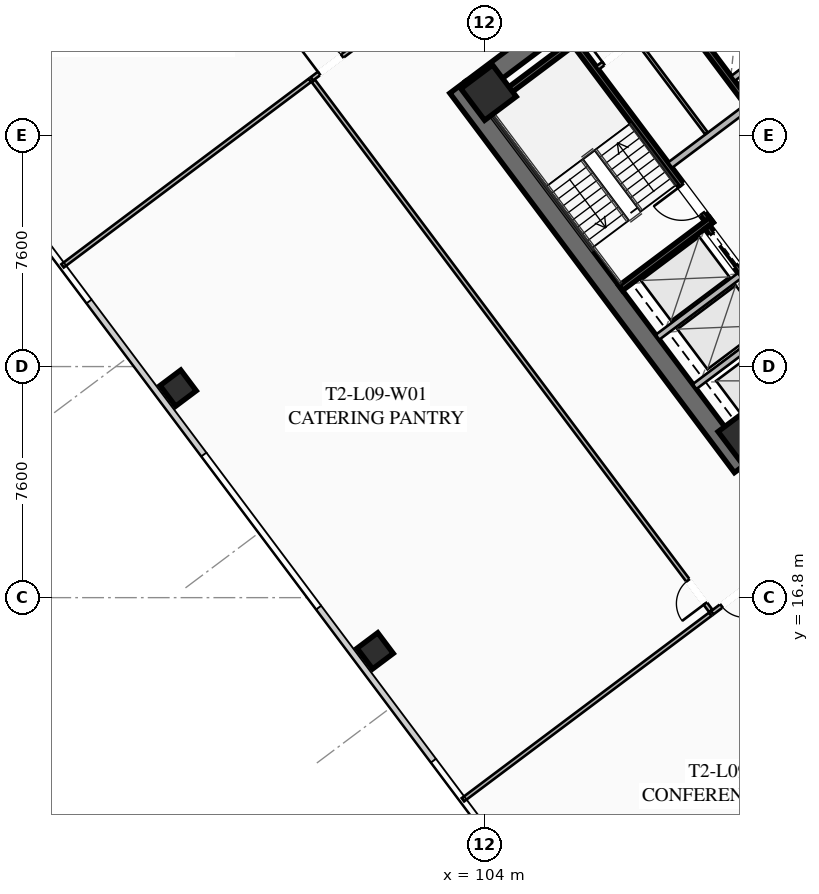
"""IFC4 building model, lengths in metres.
Left out: names, types, materials, properties, quantities, classifications, styles, units other than length and angle.
Written with IfcOpenShell. Run it as: python <this file> out.ifc"""

import sys

from ifc_helpers import new_model, si_unit, direction, frame, frame_2d, origin, origin_2d, place, context, subcontext, project, spatial, rectangle, hollow_rectangle, extrude, element, fill, save


model = new_model("IFC4")
c1 = context("Model", 3, precision=1e-05, world=origin(), true_north=direction((0.0, 1.0)))
c2 = subcontext(c1, "Body", "Model", "MODEL_VIEW")
j1 = project(units=[si_unit("LENGTHUNIT", "METRE"), si_unit("PLANEANGLEUNIT", "RADIAN")], contexts=[c1])
p1 = place(None, origin())
s1 = spatial("IfcSite", under=j1, at=p1, CompositionType="ELEMENT")
p2 = place(p1, origin())
s2 = spatial("IfcBuilding", under=s1, at=p2, CompositionType="ELEMENT")
p3 = place(p2, frame((0.0, 0.0, 38.8)))
s3 = spatial("IfcBuildingStorey", under=s2, at=p3, CompositionType="ELEMENT", Elevation=38.8)
p4 = place(p3, frame((112.476, 21.107, 0.0), z_axis=(0.0, 0.0, 1.0), x_axis=(-0.600005007985, 0.799996243986, 0.0)))
e1 = element("IfcWall", 1, at=p4, inside=s3, PredefinedType="SHEAR", context=c2, shape_type="SweptSolid", body=[
    extrude(rectangle(XDim=15.6, YDim=0.65, at=frame_2d((7.8, 0.0))), origin(), (0.0, 0.0, 1.0), 3.55),
])
p5 = place(p3, frame((124.429, 30.478, 0.0), z_axis=(0.0, 0.0, 1.0), x_axis=(-0.799998028465, -0.600002628705, 0.0)))
e2 = element("IfcWall", 2, at=p5, inside=s3, PredefinedType="SHEAR", context=c2, shape_type="SweptSolid", body=[
    extrude(rectangle(XDim=14.86, YDim=0.65, at=frame_2d((7.43, 0.0))), origin(), (0.0, 0.0, 1.0), 3.55),
])
p6 = place(p5, frame((9.13, 0.0, 0.0)))
e3 = element("IfcOpeningElement", 3, at=p6, cuts=e2, PredefinedType="OPENING", context=c2, shape_type="SweptSolid", body=[
    extrude(rectangle(XDim=1.25, YDim=2.25, at=frame_2d((0.625, 1.125))), frame((0.0, 0.335, 0.0), z_axis=(0.0, -1.0, 0.0), x_axis=(1.0, 0.0, 0.0)), (0.0, 0.0, 1.0), 0.67),
])
p7 = place(p5, frame((4.08, 0.0, 0.0)))
e4 = element("IfcOpeningElement", 4, at=p7, cuts=e2, PredefinedType="OPENING", context=c2, shape_type="SweptSolid", body=[
    extrude(rectangle(XDim=1.25, YDim=2.25, at=frame_2d((0.625, 1.125))), frame((0.0, 0.335, 0.0), z_axis=(0.0, -1.0, 0.0), x_axis=(1.0, 0.0, 0.0)), (0.0, 0.0, 1.0), 0.67),
])
p8 = place(p3, frame((103.571, 33.522, 0.0), z_axis=(0.0, 0.0, 1.0), x_axis=(0.799998028465, 0.600002628705, 0.0)))
e5 = element("IfcWall", 5, at=p8, inside=s3, PredefinedType="SHEAR", context=c2, shape_type="SweptSolid", body=[
    extrude(rectangle(XDim=14.86, YDim=0.65, at=frame_2d((7.43, 0.0))), origin(), (0.0, 0.0, 1.0), 3.55),
])
p9 = place(p8, frame((4.48, 0.0, 0.0)))
e6 = element("IfcOpeningElement", 6, at=p9, cuts=e5, PredefinedType="OPENING", context=c2, shape_type="SweptSolid", body=[
    extrude(rectangle(XDim=1.25, YDim=2.25, at=frame_2d((0.625, 1.125))), frame((0.0, 0.335, 0.0), z_axis=(0.0, -1.0, 0.0), x_axis=(1.0, 0.0, 0.0)), (0.0, 0.0, 1.0), 0.67),
])
p10 = place(p8, frame((9.53, 0.0, 0.0)))
e7 = element("IfcOpeningElement", 7, at=p10, cuts=e5, PredefinedType="OPENING", context=c2, shape_type="SweptSolid", body=[
    extrude(rectangle(XDim=1.25, YDim=2.25, at=frame_2d((0.625, 1.125))), frame((0.0, 0.335, 0.0), z_axis=(0.0, -1.0, 0.0), x_axis=(1.0, 0.0, 0.0)), (0.0, 0.0, 1.0), 0.67),
])
for number, where, z_axis, x_axis in (
    (8, (112.59, 22.13, 0.0), (0.0, 0.0, 1.0), (0.8, 0.6, 0.0)),
    (9, (104.13, 33.41, 0.0), (0.0, 0.0, 1.0), (0.8, 0.6, 0.0)),
):
    element("IfcColumn", number, at=place(p3, frame(where, z_axis=z_axis, x_axis=x_axis)), inside=s3, PredefinedType="COLUMN", context=c2, shape_type="SweptSolid", body=[
        extrude(hollow_rectangle(XDim=1.3, YDim=1.3, WallThickness=0.05, at=origin_2d()), origin(), (0.0, 0.0, 1.0), 3.35),
    ])
for number, where, z_axis, x_axis in (
    (10, (93.92, 23.69, 0.0), (0.0, 0.0, 1.0), (0.8, 0.6, 0.0)),
    (11, (100.4, 15.05, 0.0), (0.0, 0.0, 1.0), (0.8, 0.6, 0.0)),
):
    element("IfcColumn", number, at=place(p3, frame(where, z_axis=z_axis, x_axis=x_axis)), inside=s3, PredefinedType="COLUMN", context=c2, shape_type="SweptSolid", body=[
        extrude(hollow_rectangle(XDim=0.85, YDim=0.85, WallThickness=0.035, at=origin_2d()), origin(), (0.0, 0.0, 1.0), 3.35),
    ])
p11 = place(p3, frame((111.44, 29.08, 0.0), z_axis=(0.0, 0.0, 1.0), x_axis=(-0.600009827119, 0.799992629566, 0.0)))
e12 = element("IfcWall", 12, at=p11, inside=s3, PredefinedType="SHEAR", context=c2, shape_type="SweptSolid", body=[
    extrude(rectangle(XDim=7.95, YDim=0.2, at=frame_2d((3.975, 0.0))), origin(), (0.0, 0.0, 1.0), 3.35),
])
p12 = place(p11, frame((0.45, 0.0, 0.0)))
e13 = element("IfcOpeningElement", 13, at=p12, cuts=e12, PredefinedType="OPENING", context=c2, shape_type="SweptSolid", body=[
    extrude(rectangle(XDim=1.15, YDim=2.2, at=frame_2d((0.575, 1.1))), frame((0.0, 0.11, 0.0), z_axis=(0.0, -1.0, 0.0), x_axis=(1.0, 0.0, 0.0)), (0.0, 0.0, 1.0), 0.22),
])
for number, where, z_axis, x_axis in (
    (14, (108.476, 26.982, 0.0), (0.0, 0.0, 1.0), (0.8, 0.6, 0.0)),
    (15, (104.036, 32.902, 0.0), (0.0, 0.0, 1.0), (0.8, 0.6, 0.0)),
):
    element("IfcWall", number, at=place(p3, frame(where, z_axis=z_axis, x_axis=x_axis)), inside=s3, PredefinedType="SHEAR", context=c2, shape_type="SweptSolid", body=[
        extrude(rectangle(XDim=3.73, YDim=0.2, at=frame_2d((1.865, 0.0))), origin(), (0.0, 0.0, 1.0), 3.35),
    ])
p13 = place(p3, frame((117.938, 26.016, 0.0), z_axis=(0.0, 0.0, 1.0), x_axis=(-0.600005463273, 0.799995902516, 0.0)))
e16 = element("IfcWall", 16, at=p13, inside=s3, PredefinedType="SHEAR", context=c2, shape_type="SweptSolid", body=[
    extrude(rectangle(XDim=14.3, YDim=0.2, at=frame_2d((7.15, 0.0))), origin(), (0.0, 0.0, 1.0), 3.35),
])
p14 = place(p3, frame((110.104, 31.028, 0.0), z_axis=(0.0, 0.0, 1.0), x_axis=(0.800018601094, 0.59997519774, 0.0)))
e17 = element("IfcWall", 17, at=p14, inside=s3, PredefinedType="SOLIDWALL", context=c2, shape_type="SweptSolid", body=[
    extrude(rectangle(XDim=3.15, YDim=0.22, at=frame_2d((1.575, 0.0))), origin(), (0.0, 0.0, 1.0), 2.703),
])
p15 = place(p3, frame((115.13, 23.91, 0.0), z_axis=(0.0, 0.0, 1.0), x_axis=(-0.599975393228, 0.800018454488, 0.0)))
e18 = element("IfcWall", 18, at=p15, inside=s3, PredefinedType="SHEAR", context=c2, shape_type="SweptSolid", body=[
    extrude(rectangle(XDim=6.35, YDim=0.2, at=frame_2d((3.175, 0.0))), origin(), (0.0, 0.0, 1.0), 3.35),
])
p16 = place(p15, frame((4.775, 0.0, 0.0)))
e19 = element("IfcOpeningElement", 19, at=p16, cuts=e18, PredefinedType="OPENING", context=c2, shape_type="SweptSolid", body=[
    extrude(rectangle(XDim=1.3, YDim=2.25, at=frame_2d((0.65, 1.125))), frame((0.0, 0.11, 0.0), z_axis=(0.0, -1.0, 0.0), x_axis=(1.0, 0.0, 0.0)), (0.0, 0.0, 1.0), 0.22),
])
p17 = place(p15, frame((2.775, 0.0, 0.0)))
e20 = element("IfcOpeningElement", 20, at=p17, cuts=e18, PredefinedType="OPENING", context=c2, shape_type="SweptSolid", body=[
    extrude(rectangle(XDim=1.3, YDim=2.25, at=frame_2d((0.65, 1.125))), frame((0.0, 0.11, 0.0), z_axis=(0.0, -1.0, 0.0), x_axis=(1.0, 0.0, 0.0)), (0.0, 0.0, 1.0), 0.22),
])
p18 = place(p15, frame((0.575, 0.0, 0.0)))
e21 = element("IfcOpeningElement", 21, at=p18, cuts=e18, PredefinedType="OPENING", context=c2, shape_type="SweptSolid", body=[
    extrude(rectangle(XDim=1.3, YDim=2.25, at=frame_2d((0.65, 1.125))), frame((0.0, 0.11, 0.0), z_axis=(0.0, -1.0, 0.0), x_axis=(1.0, 0.0, 0.0)), (0.0, 0.0, 1.0), 0.22),
])
for number, where, z_axis, x_axis in (
    (22, (110.906, 23.742, 0.0), (0.0, 0.0, 1.0), (0.8, 0.6, 0.0)),
    (23, (109.688, 25.366, 0.0), (0.0, 0.0, 1.0), (0.8, 0.6, 0.0)),
):
    element("IfcWall", number, at=place(p3, frame(where, z_axis=z_axis, x_axis=x_axis)), inside=s3, PredefinedType="SOLIDWALL", context=c2, shape_type="SweptSolid", body=[
        extrude(rectangle(XDim=3.38, YDim=0.2, at=frame_2d((1.69, 0.0))), origin(), (0.0, 0.0, 1.0), 3.35),
    ])
p19 = place(p3, frame((107.71, 34.22, 0.0), z_axis=(0.0, 0.0, 1.0), x_axis=(0.799981399002, 0.60002480053, 0.0)))
e24 = element("IfcWall", 24, at=p19, inside=s3, PredefinedType="PARTITIONING", context=c2, shape_type="SweptSolid", body=[
    extrude(rectangle(XDim=3.15, YDim=0.135, at=frame_2d((1.575, 0.0))), origin(), (0.0, 0.0, 1.0), 2.703),
])
p20 = place(p19, frame((0.25, 0.0, 0.0)))
e25 = element("IfcOpeningElement", 25, at=p20, cuts=e24, PredefinedType="OPENING", context=c2, shape_type="SweptSolid", body=[
    extrude(rectangle(XDim=0.95, YDim=2.05, at=frame_2d((0.475, 1.025))), frame((0.0, 0.077, 0.0), z_axis=(0.0, -1.0, 0.0), x_axis=(1.0, 0.0, 0.0)), (0.0, 0.0, 1.0), 0.155),
])
p21 = place(p19, frame((1.95, 0.0, 0.0)))
e26 = element("IfcOpeningElement", 26, at=p21, cuts=e24, PredefinedType="OPENING", context=c2, shape_type="SweptSolid", body=[
    extrude(rectangle(XDim=0.95, YDim=2.05, at=frame_2d((0.475, 1.025))), frame((0.0, 0.077, 0.0), z_axis=(0.0, -1.0, 0.0), x_axis=(1.0, 0.0, 0.0)), (0.0, 0.0, 1.0), 0.155),
])
p22 = place(p3, frame((111.296, 32.072, 0.0), z_axis=(0.0, 0.0, 1.0), x_axis=(-0.59995887973, 0.800030838552, 0.0)))
e27 = element("IfcWall", 27, at=p22, inside=s3, PredefinedType="PARTITIONING", context=c2, shape_type="SweptSolid", body=[
    extrude(rectangle(XDim=3.8, YDim=0.11, at=frame_2d((1.9, 0.0))), origin(), (0.0, 0.0, 1.0), 2.703),
])
p23 = place(p3, frame((115.11, 33.27, 0.0), z_axis=(0.0, 0.0, 1.0), x_axis=(-0.600011488909, 0.79999138319, 0.0)))
e28 = element("IfcWall", 28, at=p23, inside=s3, PredefinedType="SOLIDWALL", context=c2, shape_type="SweptSolid", body=[
    extrude(rectangle(XDim=6.8, YDim=0.2, at=frame_2d((3.4, 0.0))), origin(), (0.0, 0.0, 1.0), 3.35),
])
p24 = place(p3, frame((112.176, 33.882, 0.0), z_axis=(0.0, 0.0, 1.0), x_axis=(0.8, 0.6, 0.0)))
e29 = element("IfcWall", 29, at=p24, inside=s3, PredefinedType="SOLIDWALL", context=c2, shape_type="SweptSolid", body=[
    extrude(rectangle(XDim=1.88, YDim=0.2, at=frame_2d((0.94, 0.0))), origin(), (0.0, 0.0, 1.0), 3.35),
])
p25 = place(p3, frame((98.316, 33.862, 0.0), z_axis=(0.0, 0.0, 1.0), x_axis=(0.800001947934, 0.599997402746, 0.0)))
e30 = element("IfcWall", 30, at=p25, inside=s3, PredefinedType="PARTITIONING", context=c2, shape_type="SweptSolid", body=[
    extrude(rectangle(XDim=30.08, YDim=0.135, at=frame_2d((15.04, 0.0))), origin(), (0.0, 0.0, 1.0), 2.703),
])
p26 = place(p25, frame((0.3, 0.0, 0.0)))
e31 = element("IfcOpeningElement", 31, at=p26, cuts=e30, PredefinedType="OPENING", context=c2, shape_type="SweptSolid", body=[
    extrude(rectangle(XDim=0.95, YDim=2.05, at=frame_2d((0.475, 1.025))), frame((0.0, 0.077, 0.0), z_axis=(0.0, -1.0, 0.0), x_axis=(1.0, 0.0, 0.0)), (0.0, 0.0, 1.0), 0.155),
])
p27 = place(p25, frame((7.172, 0.0, 0.0)))
e32 = element("IfcOpeningElement", 32, at=p27, cuts=e30, PredefinedType="OPENING", context=c2, shape_type="SweptSolid", body=[
    extrude(rectangle(XDim=0.95, YDim=2.05, at=frame_2d((0.475, 1.025))), frame((0.0, 0.077, 0.0), z_axis=(0.0, -1.0, 0.0), x_axis=(1.0, 0.0, 0.0)), (0.0, 0.0, 1.0), 0.155),
])
p28 = place(p25, frame((11.218, 0.0, 0.0)))
e33 = element("IfcOpeningElement", 33, at=p28, cuts=e30, PredefinedType="OPENING", context=c2, shape_type="SweptSolid", body=[
    extrude(rectangle(XDim=0.95, YDim=2.05, at=frame_2d((0.475, 1.025))), frame((0.0, 0.077, 0.0), z_axis=(0.0, -1.0, 0.0), x_axis=(1.0, 0.0, 0.0)), (0.0, 0.0, 1.0), 0.155),
])
p29 = place(p25, frame((28.83, 0.0, 0.0)))
e34 = element("IfcOpeningElement", 34, at=p29, cuts=e30, PredefinedType="OPENING", context=c2, shape_type="SweptSolid", body=[
    extrude(rectangle(XDim=0.95, YDim=2.05, at=frame_2d((0.475, 1.025))), frame((0.0, 0.077, 0.0), z_axis=(0.0, -1.0, 0.0), x_axis=(1.0, 0.0, 0.0)), (0.0, 0.0, 1.0), 0.155),
])
p30 = place(p3, frame((135.55, 34.35, 0.0), z_axis=(0.0, 0.0, 1.0), x_axis=(-0.799998052067, -0.600002597235, 0.0)))
e35 = element("IfcWall", 35, at=p30, inside=s3, PredefinedType="PARTITIONING", context=c2, shape_type="SweptSolid", body=[
    extrude(rectangle(XDim=30.08, YDim=0.135, at=frame_2d((15.04, 0.0))), origin(), (0.0, 0.0, 1.0), 2.703),
])
p31 = place(p30, frame((28.75, 0.0, 0.0)))
e36 = element("IfcOpeningElement", 36, at=p31, cuts=e35, PredefinedType="OPENING", context=c2, shape_type="SweptSolid", body=[
    extrude(rectangle(XDim=0.95, YDim=2.05, at=frame_2d((0.475, 1.025))), frame((0.0, 0.077, 0.0), z_axis=(0.0, -1.0, 0.0), x_axis=(1.0, 0.0, 0.0)), (0.0, 0.0, 1.0), 0.155),
])
p32 = place(p30, frame((21.999, 0.0, 0.0)))
e37 = element("IfcOpeningElement", 37, at=p32, cuts=e35, PredefinedType="OPENING", context=c2, shape_type="SweptSolid", body=[
    extrude(rectangle(XDim=0.95, YDim=2.05, at=frame_2d((0.475, 1.025))), frame((0.0, 0.077, 0.0), z_axis=(0.0, -1.0, 0.0), x_axis=(1.0, 0.0, 0.0)), (0.0, 0.0, 1.0), 0.155),
])
p33 = place(p30, frame((17.939, 0.0, 0.0)))
e38 = element("IfcOpeningElement", 38, at=p33, cuts=e35, PredefinedType="OPENING", context=c2, shape_type="SweptSolid", body=[
    extrude(rectangle(XDim=0.95, YDim=2.05, at=frame_2d((0.475, 1.025))), frame((0.0, 0.077, 0.0), z_axis=(0.0, -1.0, 0.0), x_axis=(1.0, 0.0, 0.0)), (0.0, 0.0, 1.0), 0.155),
])
p34 = place(p30, frame((0.38, 0.0, 0.0)))
e39 = element("IfcOpeningElement", 39, at=p34, cuts=e35, PredefinedType="OPENING", context=c2, shape_type="SweptSolid", body=[
    extrude(rectangle(XDim=0.95, YDim=2.05, at=frame_2d((0.475, 1.025))), frame((0.0, 0.077, 0.0), z_axis=(0.0, -1.0, 0.0), x_axis=(1.0, 0.0, 0.0)), (0.0, 0.0, 1.0), 0.155),
])
p35 = place(p3, frame((111.438, 16.366, 0.0), z_axis=(0.0, 0.0, 1.0), x_axis=(-0.599996414648, 0.800002689001, 0.0)))
e40 = element("IfcWall", 40, at=p35, inside=s3, PredefinedType="PARTITIONING", context=c2, shape_type="SweptSolid", body=[
    extrude(rectangle(XDim=21.79, YDim=0.135, at=frame_2d((10.895, 0.0))), origin(), (0.0, 0.0, 1.0), 2.703),
])
p36 = place(p35, frame((0.3, 0.0, 0.0)))
e41 = element("IfcOpeningElement", 41, at=p36, cuts=e40, PredefinedType="OPENING", context=c2, shape_type="SweptSolid", body=[
    extrude(rectangle(XDim=0.95, YDim=2.05, at=frame_2d((0.475, 1.025))), frame((0.0, 0.077, 0.0), z_axis=(0.0, -1.0, 0.0), x_axis=(1.0, 0.0, 0.0)), (0.0, 0.0, 1.0), 0.155),
])
p37 = place(p3, frame((98.252, 33.814, 0.0), z_axis=(0.0, 0.0, 1.0), x_axis=(-0.799997119281, -0.600003840939, 0.0)))
e42 = element("IfcWall", 42, at=p37, inside=s3, PredefinedType="PARTITIONING", context=c2, shape_type="SweptSolid", body=[
    extrude(rectangle(XDim=10.17, YDim=0.135, at=frame_2d((5.085, 0.0))), origin(), (0.0, 0.0, 1.0), 2.703),
])
p38 = place(p3, frame((103.286, 10.152, 0.0), z_axis=(0.0, 0.0, 1.0), x_axis=(0.800017283844, 0.599976954183, 0.0)))
e43 = element("IfcWall", 43, at=p38, inside=s3, PredefinedType="PARTITIONING", context=c2, shape_type="SweptSolid", body=[
    extrude(rectangle(XDim=10.17, YDim=0.135, at=frame_2d((5.085, 0.0))), origin(), (0.0, 0.0, 1.0), 2.703),
])
p39 = place(p12, origin())
e44 = element("IfcDoor", 44, at=p39, inside=s3, OperationType="SINGLE_SWING_RIGHT", PredefinedType="DOOR", context=c2, shape_type="SweptSolid", body=[
    extrude(rectangle(XDim=1.15, YDim=2.2, at=frame_2d((0.575, 1.1))), frame((0.0, 0.025, 0.0), z_axis=(0.0, -1.0, 0.0), x_axis=(1.0, 0.0, 0.0)), (0.0, 0.0, 1.0), 0.05),
])
fill(e13, e44)
p40 = place(p20, origin())
e45 = element("IfcDoor", 45, at=p40, inside=s3, OperationType="SINGLE_SWING_LEFT", PredefinedType="DOOR", context=c2, shape_type="SweptSolid", body=[
    extrude(rectangle(XDim=0.95, YDim=2.05, at=frame_2d((0.475, 1.025))), frame((0.0, 0.025, 0.0), z_axis=(0.0, -1.0, 0.0), x_axis=(1.0, 0.0, 0.0)), (0.0, 0.0, 1.0), 0.05),
])
fill(e25, e45)
p41 = place(p26, origin())
e46 = element("IfcDoor", 46, at=p41, inside=s3, OperationType="SINGLE_SWING_LEFT", PredefinedType="DOOR", context=c2, shape_type="SweptSolid", body=[
    extrude(rectangle(XDim=0.95, YDim=2.05, at=frame_2d((0.475, 1.025))), frame((0.0, 0.025, 0.0), z_axis=(0.0, -1.0, 0.0), x_axis=(1.0, 0.0, 0.0)), (0.0, 0.0, 1.0), 0.05),
])
fill(e31, e46)
p42 = place(p31, origin())
e47 = element("IfcDoor", 47, at=p42, inside=s3, OperationType="SINGLE_SWING_LEFT", PredefinedType="DOOR", context=c2, shape_type="SweptSolid", body=[
    extrude(rectangle(XDim=0.95, YDim=2.05, at=frame_2d((0.475, 1.025))), frame((0.0, 0.025, 0.0), z_axis=(0.0, -1.0, 0.0), x_axis=(1.0, 0.0, 0.0)), (0.0, 0.0, 1.0), 0.05),
])
fill(e36, e47)
p43 = place(p36, origin())
e48 = element("IfcDoor", 48, at=p43, inside=s3, OperationType="SINGLE_SWING_LEFT", PredefinedType="DOOR", context=c2, shape_type="SweptSolid", body=[
    extrude(rectangle(XDim=0.95, YDim=2.05, at=frame_2d((0.475, 1.025))), frame((0.0, 0.025, 0.0), z_axis=(0.0, -1.0, 0.0), x_axis=(1.0, 0.0, 0.0)), (0.0, 0.0, 1.0), 0.05),
])
fill(e41, e48)
p44 = place(p16, origin())
e49 = element("IfcDoor", 49, at=p44, inside=s3, OperationType="SLIDING_TO_LEFT", PredefinedType="DOOR", context=c2, shape_type="SweptSolid", body=[
    extrude(rectangle(XDim=1.3, YDim=2.25, at=frame_2d((0.65, 1.125))), frame((0.0, 0.025, 0.0), z_axis=(0.0, -1.0, 0.0), x_axis=(1.0, 0.0, 0.0)), (0.0, 0.0, 1.0), 0.05),
])
fill(e19, e49)
save(model, sys.argv[1])
